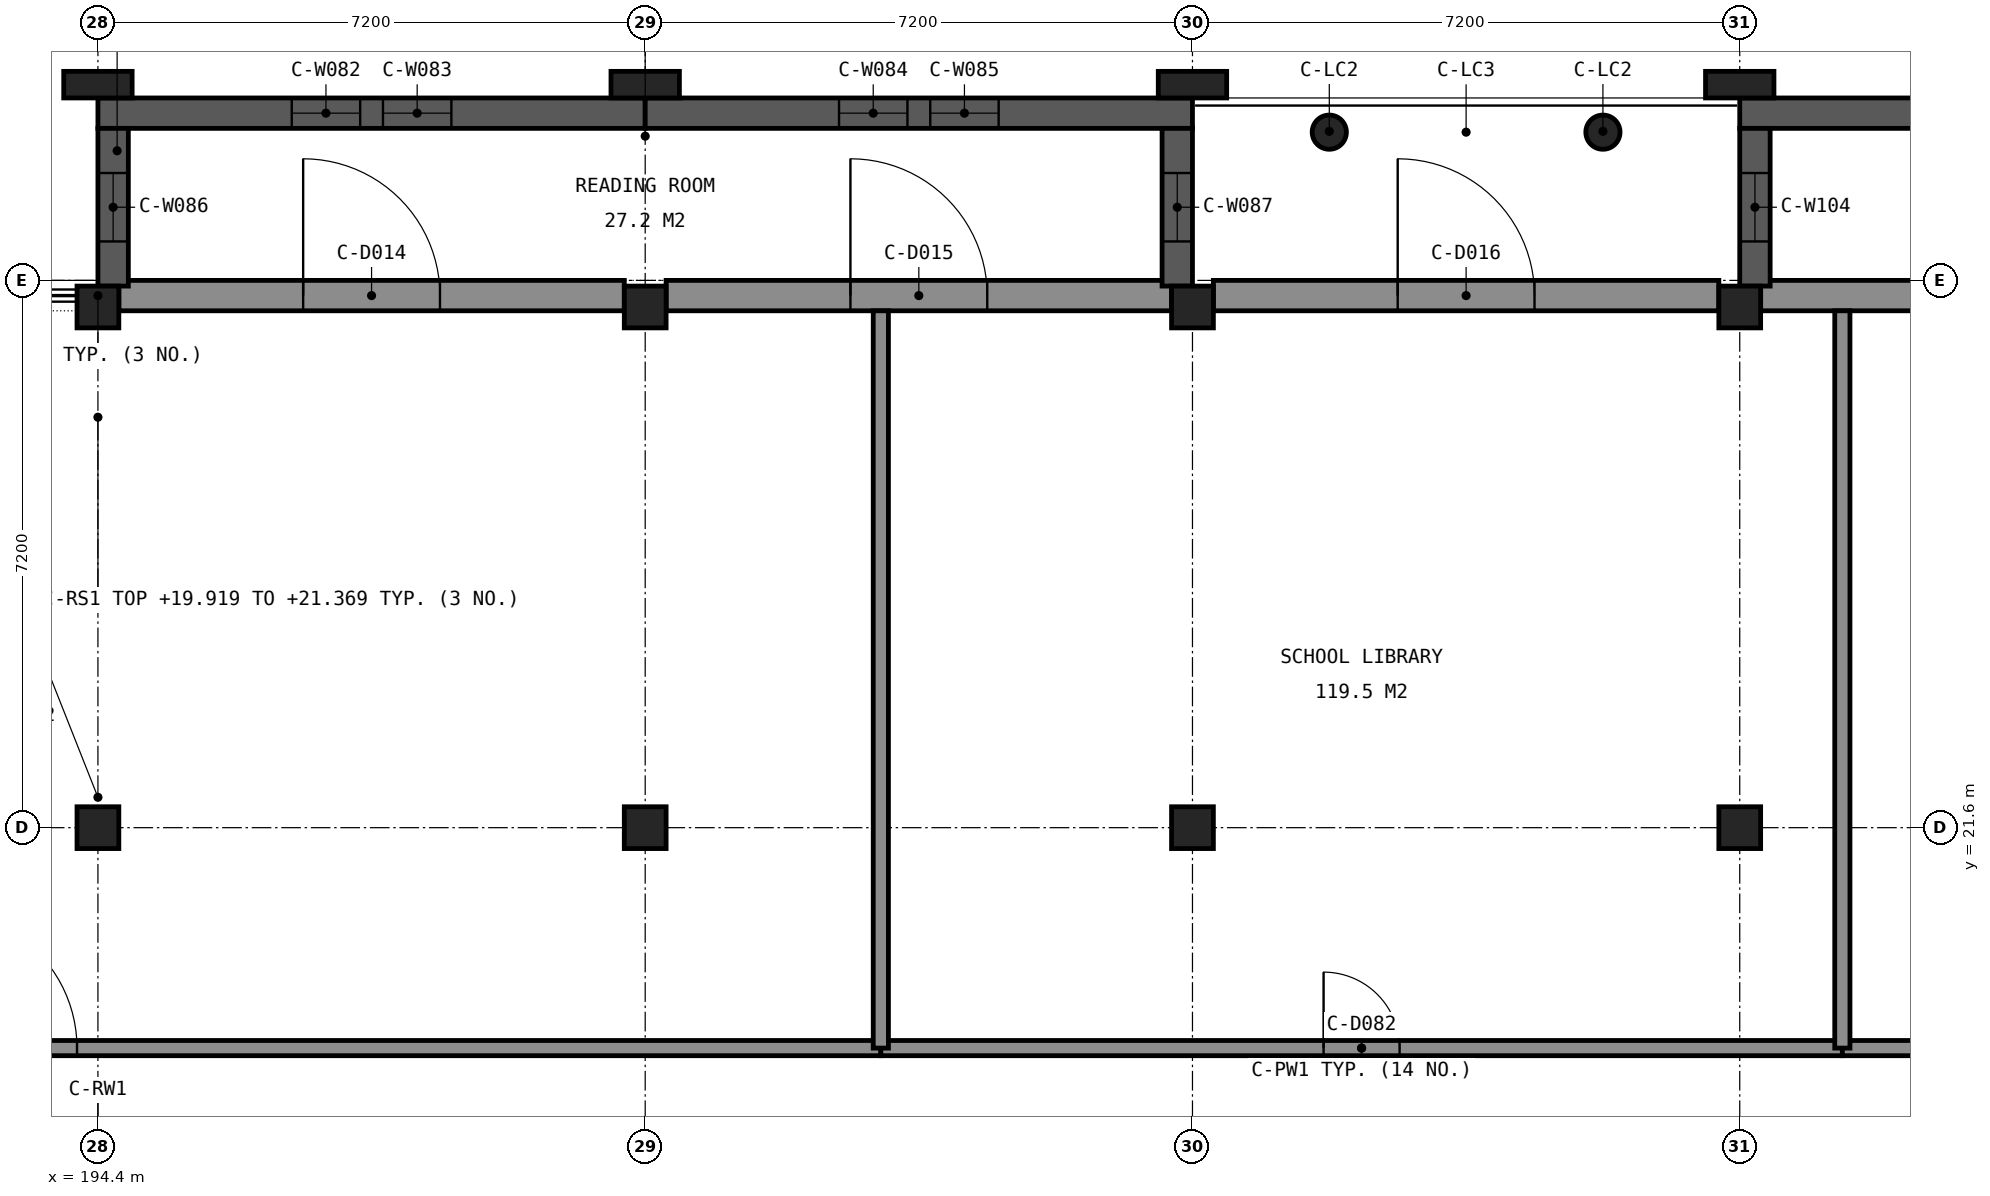
"""IFC4 building model, lengths in metres.
Left out: names, types, materials, properties, quantities, classifications, styles, units other than length and angle.
Written with IfcOpenShell. Run it as: python <this file> out.ifc"""

import sys

from ifc_helpers import new_model, si_unit, direction, frame, frame_2d, origin, origin_2d, place, context, subcontext, project, spatial, rectangle, circle, extrude, element, fill, save


model = new_model("IFC4")
c1 = context("Model", 3, precision=1e-05, world=origin(), true_north=direction((0.0, 1.0)))
c2 = subcontext(c1, "Body", "Model", "MODEL_VIEW")
j1 = project(units=[si_unit("LENGTHUNIT", "METRE"), si_unit("PLANEANGLEUNIT", "RADIAN")], contexts=[c1])
p1 = place(None, origin())
s1 = spatial("IfcSite", under=j1, at=p1, CompositionType="ELEMENT")
p2 = place(p1, origin())
s2 = spatial("IfcBuilding", under=s1, at=p2, CompositionType="ELEMENT")
p3 = place(p2, frame((0.0, 0.0, 14.4)))
s3 = spatial("IfcBuildingStorey", under=s2, at=p3, CompositionType="ELEMENT", Elevation=14.4)
for number, where, z_axis, x_axis in (
    (1, (194.4, 28.45, 0.0), (0.0, 0.0, 1.0), (1.0, 0.0, 0.0)),
    (2, (201.6, 28.45, 0.0), (0.0, 0.0, 1.0), (1.0, 0.0, 0.0)),
    (3, (208.8, 28.45, 0.0), (0.0, 0.0, 1.0), (1.0, 0.0, 0.0)),
    (4, (216.0, 28.45, 0.0), (0.0, 0.0, 1.0), (1.0, 0.0, 0.0)),
    (5, (194.4, 21.6, 0.0), (0.0, 0.0, 1.0), (1.0, 0.0, 0.0)),
    (6, (201.6, 21.6, 0.0), (0.0, 0.0, 1.0), (1.0, 0.0, 0.0)),
    (7, (208.8, 21.6, 0.0), (0.0, 0.0, 1.0), (1.0, 0.0, 0.0)),
    (8, (216.0, 21.6, 0.0), (0.0, 0.0, 1.0), (1.0, 0.0, 0.0)),
):
    element("IfcColumn", number, at=place(p3, frame(where, z_axis=z_axis, x_axis=x_axis)), inside=s3, PredefinedType="COLUMN", context=c2, shape_type="SweptSolid", body=[
        extrude(rectangle(XDim=0.55, YDim=0.55, at=origin_2d()), origin(), (0.0, 0.0, 1.0), 4.8),
    ])
p4 = place(p3, frame((194.675, 28.6, 0.0), z_axis=(0.0, 0.0, 1.0), x_axis=(1.0, 0.0, 0.0)))
e9 = element("IfcWall", 9, at=p4, inside=s3, PredefinedType="SOLIDWALL", context=c2, shape_type="SweptSolid", body=[
    extrude(rectangle(XDim=6.65, YDim=0.4, at=frame_2d((3.325, 0.0))), origin(), (0.0, 0.0, 1.0), 3.7),
])
p5 = place(p4, frame((2.425, 0.0, 0.0)))
e10 = element("IfcOpeningElement", 10, at=p5, cuts=e9, PredefinedType="OPENING", context=c2, shape_type="SweptSolid", body=[
    extrude(rectangle(XDim=1.8, YDim=2.1, at=frame_2d((0.9, 1.05))), frame((0.0, 0.21, 0.0), z_axis=(0.0, -1.0, 0.0), x_axis=(1.0, 0.0, 0.0)), (0.0, 0.0, 1.0), 0.42),
])
p6 = place(p3, frame((201.875, 28.6, 0.0), z_axis=(0.0, 0.0, 1.0), x_axis=(1.0, 0.0, 0.0)))
e11 = element("IfcWall", 11, at=p6, inside=s3, PredefinedType="SOLIDWALL", context=c2, shape_type="SweptSolid", body=[
    extrude(rectangle(XDim=6.65, YDim=0.4, at=frame_2d((3.325, 0.0))), origin(), (0.0, 0.0, 1.0), 3.7),
])
p7 = place(p6, frame((2.425, 0.0, 0.0)))
e12 = element("IfcOpeningElement", 12, at=p7, cuts=e11, PredefinedType="OPENING", context=c2, shape_type="SweptSolid", body=[
    extrude(rectangle(XDim=1.8, YDim=2.1, at=frame_2d((0.9, 1.05))), frame((0.0, 0.21, 0.0), z_axis=(0.0, -1.0, 0.0), x_axis=(1.0, 0.0, 0.0)), (0.0, 0.0, 1.0), 0.42),
])
p8 = place(p3, frame((209.075, 28.6, 0.0), z_axis=(0.0, 0.0, 1.0), x_axis=(1.0, 0.0, 0.0)))
e13 = element("IfcWall", 13, at=p8, inside=s3, PredefinedType="SOLIDWALL", context=c2, shape_type="SweptSolid", body=[
    extrude(rectangle(XDim=6.65, YDim=0.4, at=frame_2d((3.325, 0.0))), origin(), (0.0, 0.0, 1.0), 3.7),
])
p9 = place(p8, frame((2.425, 0.0, 0.0)))
e14 = element("IfcOpeningElement", 14, at=p9, cuts=e13, PredefinedType="OPENING", context=c2, shape_type="SweptSolid", body=[
    extrude(rectangle(XDim=1.8, YDim=2.1, at=frame_2d((0.9, 1.05))), frame((0.0, 0.21, 0.0), z_axis=(0.0, -1.0, 0.0), x_axis=(1.0, 0.0, 0.0)), (0.0, 0.0, 1.0), 0.42),
])
p10 = place(p3, frame((216.275, 28.6, 0.0), z_axis=(0.0, 0.0, 1.0), x_axis=(1.0, 0.0, 0.0)))
e15 = element("IfcWall", 15, at=p10, inside=s3, PredefinedType="SOLIDWALL", context=c2, shape_type="SweptSolid", body=[
    extrude(rectangle(XDim=6.65, YDim=0.4, at=frame_2d((3.325, 0.0))), origin(), (0.0, 0.0, 1.0), 3.7),
])
p11 = place(p10, frame((2.425, 0.0, 0.0)))
e16 = element("IfcOpeningElement", 16, at=p11, cuts=e15, PredefinedType="OPENING", context=c2, shape_type="SweptSolid", body=[
    extrude(rectangle(XDim=1.8, YDim=2.1, at=frame_2d((0.9, 1.05))), frame((0.0, 0.21, 0.0), z_axis=(0.0, -1.0, 0.0), x_axis=(1.0, 0.0, 0.0)), (0.0, 0.0, 1.0), 0.42),
])
p12 = place(p3, frame((158.4, 28.6, 4.8), z_axis=(0.0, 0.0, 1.0), x_axis=(1.0, 0.0, 0.0)))
e17 = element("IfcWall", 17, at=p12, inside=s3, PredefinedType="SOLIDWALL", context=c2, shape_type="SweptSolid", body=[
    extrude(rectangle(XDim=72.0, YDim=0.4, at=frame_2d((36.0, 0.0))), origin(), (0.0, 0.0, 1.0), 0.45),
])
for number, where, z_axis, x_axis in (
    (18, (194.4, 21.6, 4.8), (0.0, 0.0, 1.0), (1.0, 0.0, 0.0)),
    (19, (201.6, 21.6, 4.8), (0.0, 0.0, 1.0), (1.0, 0.0, 0.0)),
    (20, (208.8, 21.6, 4.8), (0.0, 0.0, 1.0), (1.0, 0.0, 0.0)),
    (21, (216.0, 21.6, 4.8), (0.0, 0.0, 1.0), (1.0, 0.0, 0.0)),
):
    element("IfcColumn", number, at=place(p3, frame(where, z_axis=z_axis, x_axis=x_axis)), inside=s3, PredefinedType="COLUMN", context=c2, shape_type="SweptSolid", body=[
        extrude(rectangle(XDim=0.3, YDim=0.3, at=origin_2d()), origin(), (0.0, 0.0, 1.0), 1.4),
    ])
p13 = place(p3, frame((194.4, 31.0, 0.0), z_axis=(0.0, 0.0, 1.0), x_axis=(1.0, 0.0, 0.0)))
e22 = element("IfcWall", 22, at=p13, inside=s3, PredefinedType="SOLIDWALL", context=c2, shape_type="SweptSolid", body=[
    extrude(rectangle(XDim=7.2, YDim=0.4, at=frame_2d((3.6, 0.0))), origin(), (0.0, 0.0, 1.0), 4.893),
])
p14 = place(p13, frame((2.55, 0.0, 1.8)))
e23 = element("IfcOpeningElement", 23, at=p14, cuts=e22, PredefinedType="OPENING", context=c2, shape_type="SweptSolid", body=[
    extrude(rectangle(XDim=0.9, YDim=1.2, at=frame_2d((0.45, 0.6))), frame((0.0, 0.21, 0.0), z_axis=(0.0, -1.0, 0.0), x_axis=(1.0, 0.0, 0.0)), (0.0, 0.0, 1.0), 0.42),
])
p15 = place(p13, frame((3.75, 0.0, 1.8)))
e24 = element("IfcOpeningElement", 24, at=p15, cuts=e22, PredefinedType="OPENING", context=c2, shape_type="SweptSolid", body=[
    extrude(rectangle(XDim=0.9, YDim=1.2, at=frame_2d((0.45, 0.6))), frame((0.0, 0.21, 0.0), z_axis=(0.0, -1.0, 0.0), x_axis=(1.0, 0.0, 0.0)), (0.0, 0.0, 1.0), 0.42),
])
p16 = place(p3, frame((201.6, 31.0, 0.0), z_axis=(0.0, 0.0, 1.0), x_axis=(1.0, 0.0, 0.0)))
e25 = element("IfcWall", 25, at=p16, inside=s3, PredefinedType="SOLIDWALL", context=c2, shape_type="SweptSolid", body=[
    extrude(rectangle(XDim=7.2, YDim=0.4, at=frame_2d((3.6, 0.0))), origin(), (0.0, 0.0, 1.0), 4.893),
])
p17 = place(p16, frame((2.55, 0.0, 1.8)))
e26 = element("IfcOpeningElement", 26, at=p17, cuts=e25, PredefinedType="OPENING", context=c2, shape_type="SweptSolid", body=[
    extrude(rectangle(XDim=0.9, YDim=1.2, at=frame_2d((0.45, 0.6))), frame((0.0, 0.21, 0.0), z_axis=(0.0, -1.0, 0.0), x_axis=(1.0, 0.0, 0.0)), (0.0, 0.0, 1.0), 0.42),
])
p18 = place(p16, frame((3.75, 0.0, 1.8)))
e27 = element("IfcOpeningElement", 27, at=p18, cuts=e25, PredefinedType="OPENING", context=c2, shape_type="SweptSolid", body=[
    extrude(rectangle(XDim=0.9, YDim=1.2, at=frame_2d((0.45, 0.6))), frame((0.0, 0.21, 0.0), z_axis=(0.0, -1.0, 0.0), x_axis=(1.0, 0.0, 0.0)), (0.0, 0.0, 1.0), 0.42),
])
p19 = place(p3, frame((194.6, 28.725, 0.0), z_axis=(0.0, 0.0, 1.0), x_axis=(0.0, 1.0, 0.0)))
e28 = element("IfcWall", 28, at=p19, inside=s3, PredefinedType="SOLIDWALL", context=c2, shape_type="SweptSolid", body=[
    extrude(rectangle(XDim=2.075, YDim=0.4, at=frame_2d((1.038, 0.0))), origin(), (0.0, 0.0, 1.0), 4.893),
])
p20 = place(p19, frame((0.587, 0.0, 1.8)))
e29 = element("IfcOpeningElement", 29, at=p20, cuts=e28, PredefinedType="OPENING", context=c2, shape_type="SweptSolid", body=[
    extrude(rectangle(XDim=0.9, YDim=1.2, at=frame_2d((0.45, 0.6))), frame((0.0, 0.21, 0.0), z_axis=(0.0, -1.0, 0.0), x_axis=(1.0, 0.0, 0.0)), (0.0, 0.0, 1.0), 0.42),
])
p21 = place(p3, frame((208.6, 30.8, 0.0), z_axis=(0.0, 0.0, 1.0), x_axis=(0.0, -1.0, 0.0)))
e30 = element("IfcWall", 30, at=p21, inside=s3, PredefinedType="SOLIDWALL", context=c2, shape_type="SweptSolid", body=[
    extrude(rectangle(XDim=2.075, YDim=0.4, at=frame_2d((1.038, 0.0))), origin(), (0.0, 0.0, 1.0), 4.893),
])
p22 = place(p21, frame((0.587, 0.0, 1.8)))
e31 = element("IfcOpeningElement", 31, at=p22, cuts=e30, PredefinedType="OPENING", context=c2, shape_type="SweptSolid", body=[
    extrude(rectangle(XDim=0.9, YDim=1.2, at=frame_2d((0.45, 0.6))), frame((0.0, 0.21, 0.0), z_axis=(0.0, -1.0, 0.0), x_axis=(1.0, 0.0, 0.0)), (0.0, 0.0, 1.0), 0.42),
])
for number, where, z_axis, x_axis in (
    (32, (194.4, 31.375, 0.0), (0.0, 0.0, 1.0), (1.0, 0.0, 0.0)),
    (33, (201.6, 31.375, 0.0), (0.0, 0.0, 1.0), (1.0, 0.0, 0.0)),
    (34, (208.8, 31.375, 0.0), (0.0, 0.0, 1.0), (1.0, 0.0, 0.0)),
):
    element("IfcColumn", number, at=place(p3, frame(where, z_axis=z_axis, x_axis=x_axis)), inside=s3, PredefinedType="PILASTER", context=c2, shape_type="SweptSolid", body=[
        extrude(rectangle(XDim=0.9, YDim=0.35, at=origin_2d()), origin(), (0.0, 0.0, 1.0), 3.9),
    ])
p23 = place(p3, frame((216.0, 31.0, 0.0), z_axis=(0.0, 0.0, 1.0), x_axis=(1.0, 0.0, 0.0)))
e35 = element("IfcWall", 35, at=p23, inside=s3, PredefinedType="SOLIDWALL", context=c2, shape_type="SweptSolid", body=[
    extrude(rectangle(XDim=7.2, YDim=0.4, at=frame_2d((3.6, 0.0))), origin(), (0.0, 0.0, 1.0), 4.893),
])
p24 = place(p23, frame((2.55, 0.0, 1.8)))
e36 = element("IfcOpeningElement", 36, at=p24, cuts=e35, PredefinedType="OPENING", context=c2, shape_type="SweptSolid", body=[
    extrude(rectangle(XDim=0.9, YDim=1.2, at=frame_2d((0.45, 0.6))), frame((0.0, 0.21, 0.0), z_axis=(0.0, -1.0, 0.0), x_axis=(1.0, 0.0, 0.0)), (0.0, 0.0, 1.0), 0.42),
])
p25 = place(p23, frame((3.75, 0.0, 1.8)))
e37 = element("IfcOpeningElement", 37, at=p25, cuts=e35, PredefinedType="OPENING", context=c2, shape_type="SweptSolid", body=[
    extrude(rectangle(XDim=0.9, YDim=1.2, at=frame_2d((0.45, 0.6))), frame((0.0, 0.21, 0.0), z_axis=(0.0, -1.0, 0.0), x_axis=(1.0, 0.0, 0.0)), (0.0, 0.0, 1.0), 0.42),
])
p26 = place(p3, frame((216.2, 28.725, 0.0), z_axis=(0.0, 0.0, 1.0), x_axis=(0.0, 1.0, 0.0)))
e38 = element("IfcWall", 38, at=p26, inside=s3, PredefinedType="SOLIDWALL", context=c2, shape_type="SweptSolid", body=[
    extrude(rectangle(XDim=2.075, YDim=0.4, at=frame_2d((1.038, 0.0))), origin(), (0.0, 0.0, 1.0), 4.893),
])
p27 = place(p26, frame((0.587, 0.0, 1.8)))
e39 = element("IfcOpeningElement", 39, at=p27, cuts=e38, PredefinedType="OPENING", context=c2, shape_type="SweptSolid", body=[
    extrude(rectangle(XDim=0.9, YDim=1.2, at=frame_2d((0.45, 0.6))), frame((0.0, 0.21, 0.0), z_axis=(0.0, -1.0, 0.0), x_axis=(1.0, 0.0, 0.0)), (0.0, 0.0, 1.0), 0.42),
])
p28 = place(p3, frame((216.0, 31.375, 0.0), z_axis=(0.0, 0.0, 1.0), x_axis=(1.0, 0.0, 0.0)))
e40 = element("IfcColumn", 40, at=p28, inside=s3, PredefinedType="PILASTER", context=c2, shape_type="SweptSolid", body=[
    extrude(rectangle(XDim=0.9, YDim=0.35, at=origin_2d()), origin(), (0.0, 0.0, 1.0), 3.9),
])
for number, where, z_axis, x_axis in (
    (41, (210.6, 30.75, 0.0), (0.0, 0.0, 1.0), (1.0, 0.0, 0.0)),
    (42, (214.2, 30.75, 0.0), (0.0, 0.0, 1.0), (1.0, 0.0, 0.0)),
):
    element("IfcColumn", number, at=place(p3, frame(where, z_axis=z_axis, x_axis=x_axis)), inside=s3, PredefinedType="COLUMN", context=c2, shape_type="SweptSolid", body=[
        extrude(circle(Radius=0.225, at=origin_2d()), origin(), (0.0, 0.0, 1.0), 3.95),
    ])
p29 = place(p3, frame((208.8, 30.75, 4.3), z_axis=(0.0, 0.0, 1.0), x_axis=(1.0, 0.0, 0.0)))
e43 = element("IfcWall", 43, at=p29, inside=s3, PredefinedType="SOLIDWALL", context=c2, shape_type="SweptSolid", body=[
    extrude(rectangle(XDim=7.2, YDim=0.9, at=frame_2d((3.6, 0.0))), origin(), (0.0, 0.0, 1.0), 0.2),
])
p30 = place(p3, frame((181.75, 18.7, 0.0), z_axis=(0.0, 0.0, 1.0), x_axis=(1.0, 0.0, 0.0)))
e44 = element("IfcWall", 44, at=p30, inside=s3, PredefinedType="PARTITIONING", context=c2, shape_type="SweptSolid", body=[
    extrude(rectangle(XDim=22.95, YDim=0.2, at=frame_2d((11.475, 0.0))), origin(), (0.0, 0.0, 1.0), 3.7),
])
p31 = place(p30, frame((10.575, 0.0, 0.0)))
e45 = element("IfcOpeningElement", 45, at=p31, cuts=e44, PredefinedType="OPENING", context=c2, shape_type="SweptSolid", body=[
    extrude(rectangle(XDim=1.8, YDim=2.1, at=frame_2d((0.9, 1.05))), frame((0.0, 0.11, 0.0), z_axis=(0.0, -1.0, 0.0), x_axis=(1.0, 0.0, 0.0)), (0.0, 0.0, 1.0), 0.22),
])
p32 = place(p3, frame((204.7, 18.7, 0.0), z_axis=(0.0, 0.0, 1.0), x_axis=(1.0, 0.0, 0.0)))
e46 = element("IfcWall", 46, at=p32, inside=s3, PredefinedType="PARTITIONING", context=c2, shape_type="SweptSolid", body=[
    extrude(rectangle(XDim=12.65, YDim=0.2, at=frame_2d((6.325, 0.0))), origin(), (0.0, 0.0, 1.0), 3.7),
])
p33 = place(p32, frame((5.825, 0.0, 0.0)))
e47 = element("IfcOpeningElement", 47, at=p33, cuts=e46, PredefinedType="OPENING", context=c2, shape_type="SweptSolid", body=[
    extrude(rectangle(XDim=1.0, YDim=2.1, at=frame_2d((0.5, 1.05))), frame((0.0, 0.11, 0.0), z_axis=(0.0, -1.0, 0.0), x_axis=(1.0, 0.0, 0.0)), (0.0, 0.0, 1.0), 0.22),
])
p34 = place(p3, frame((217.35, 18.7, 0.0), z_axis=(0.0, 0.0, 1.0), x_axis=(1.0, 0.0, 0.0)))
e48 = element("IfcWall", 48, at=p34, inside=s3, PredefinedType="PARTITIONING", context=c2, shape_type="SweptSolid", body=[
    extrude(rectangle(XDim=12.65, YDim=0.2, at=frame_2d((6.325, 0.0))), origin(), (0.0, 0.0, 1.0), 3.7),
])
p35 = place(p34, frame((5.825, 0.0, 0.0)))
e49 = element("IfcOpeningElement", 49, at=p35, cuts=e48, PredefinedType="OPENING", context=c2, shape_type="SweptSolid", body=[
    extrude(rectangle(XDim=1.0, YDim=2.1, at=frame_2d((0.5, 1.05))), frame((0.0, 0.11, 0.0), z_axis=(0.0, -1.0, 0.0), x_axis=(1.0, 0.0, 0.0)), (0.0, 0.0, 1.0), 0.22),
])
for number, where, z_axis, x_axis in (
    (50, (204.7, 28.4, 0.0), (0.0, 0.0, 1.0), (0.0, -1.0, 0.0)),
    (51, (217.35, 28.4, 0.0), (0.0, 0.0, 1.0), (0.0, -1.0, 0.0)),
):
    element("IfcWall", number, at=place(p3, frame(where, z_axis=z_axis, x_axis=x_axis)), inside=s3, PredefinedType="PARTITIONING", context=c2, shape_type="SweptSolid", body=[
        extrude(rectangle(XDim=9.7, YDim=0.2, at=frame_2d((4.85, 0.0))), origin(), (0.0, 0.0, 1.0), 3.7),
    ])
p36 = place(p5, origin())
e52 = element("IfcDoor", 52, at=p36, inside=s3, OperationType="NOTDEFINED", PredefinedType="DOOR", context=c2, shape_type="SweptSolid", body=[
    extrude(rectangle(XDim=1.8, YDim=2.1, at=frame_2d((0.9, 1.05))), frame((0.0, 0.025, 0.0), z_axis=(0.0, -1.0, 0.0), x_axis=(1.0, 0.0, 0.0)), (0.0, 0.0, 1.0), 0.05),
])
fill(e10, e52)
p37 = place(p7, origin())
e53 = element("IfcDoor", 53, at=p37, inside=s3, OperationType="NOTDEFINED", PredefinedType="DOOR", context=c2, shape_type="SweptSolid", body=[
    extrude(rectangle(XDim=1.8, YDim=2.1, at=frame_2d((0.9, 1.05))), frame((0.0, 0.025, 0.0), z_axis=(0.0, -1.0, 0.0), x_axis=(1.0, 0.0, 0.0)), (0.0, 0.0, 1.0), 0.05),
])
fill(e12, e53)
p38 = place(p9, origin())
e54 = element("IfcDoor", 54, at=p38, inside=s3, OperationType="NOTDEFINED", PredefinedType="DOOR", context=c2, shape_type="SweptSolid", body=[
    extrude(rectangle(XDim=1.8, YDim=2.1, at=frame_2d((0.9, 1.05))), frame((0.0, 0.025, 0.0), z_axis=(0.0, -1.0, 0.0), x_axis=(1.0, 0.0, 0.0)), (0.0, 0.0, 1.0), 0.05),
])
fill(e14, e54)
p39 = place(p14, origin())
e55 = element("IfcWindow", 55, at=p39, inside=s3, PartitioningType="SINGLE_PANEL", PredefinedType="WINDOW", context=c2, shape_type="SweptSolid", body=[
    extrude(rectangle(XDim=0.9, YDim=1.2, at=frame_2d((0.45, 0.6))), frame((0.0, -0.09, 0.0), z_axis=(0.0, -1.0, 0.0), x_axis=(1.0, 0.0, 0.0)), (0.0, 0.0, 1.0), 0.06),
])
fill(e23, e55)
p40 = place(p15, origin())
e56 = element("IfcWindow", 56, at=p40, inside=s3, PartitioningType="SINGLE_PANEL", PredefinedType="WINDOW", context=c2, shape_type="SweptSolid", body=[
    extrude(rectangle(XDim=0.9, YDim=1.2, at=frame_2d((0.45, 0.6))), frame((0.0, -0.09, 0.0), z_axis=(0.0, -1.0, 0.0), x_axis=(1.0, 0.0, 0.0)), (0.0, 0.0, 1.0), 0.06),
])
fill(e24, e56)
p41 = place(p17, origin())
e57 = element("IfcWindow", 57, at=p41, inside=s3, PartitioningType="SINGLE_PANEL", PredefinedType="WINDOW", context=c2, shape_type="SweptSolid", body=[
    extrude(rectangle(XDim=0.9, YDim=1.2, at=frame_2d((0.45, 0.6))), frame((0.0, -0.09, 0.0), z_axis=(0.0, -1.0, 0.0), x_axis=(1.0, 0.0, 0.0)), (0.0, 0.0, 1.0), 0.06),
])
fill(e26, e57)
p42 = place(p18, origin())
e58 = element("IfcWindow", 58, at=p42, inside=s3, PartitioningType="SINGLE_PANEL", PredefinedType="WINDOW", context=c2, shape_type="SweptSolid", body=[
    extrude(rectangle(XDim=0.9, YDim=1.2, at=frame_2d((0.45, 0.6))), frame((0.0, -0.09, 0.0), z_axis=(0.0, -1.0, 0.0), x_axis=(1.0, 0.0, 0.0)), (0.0, 0.0, 1.0), 0.06),
])
fill(e27, e58)
p43 = place(p20, origin())
e59 = element("IfcWindow", 59, at=p43, inside=s3, PartitioningType="SINGLE_PANEL", PredefinedType="WINDOW", context=c2, shape_type="SweptSolid", body=[
    extrude(rectangle(XDim=0.9, YDim=1.2, at=frame_2d((0.45, 0.6))), frame((0.0, -0.09, 0.0), z_axis=(0.0, -1.0, 0.0), x_axis=(1.0, 0.0, 0.0)), (0.0, 0.0, 1.0), 0.06),
])
fill(e29, e59)
p44 = place(p22, origin())
e60 = element("IfcWindow", 60, at=p44, inside=s3, PartitioningType="SINGLE_PANEL", PredefinedType="WINDOW", context=c2, shape_type="SweptSolid", body=[
    extrude(rectangle(XDim=0.9, YDim=1.2, at=frame_2d((0.45, 0.6))), frame((0.0, -0.09, 0.0), z_axis=(0.0, -1.0, 0.0), x_axis=(1.0, 0.0, 0.0)), (0.0, 0.0, 1.0), 0.06),
])
fill(e31, e60)
p45 = place(p27, origin())
e61 = element("IfcWindow", 61, at=p45, inside=s3, PartitioningType="SINGLE_PANEL", PredefinedType="WINDOW", context=c2, shape_type="SweptSolid", body=[
    extrude(rectangle(XDim=0.9, YDim=1.2, at=frame_2d((0.45, 0.6))), frame((0.0, -0.09, 0.0), z_axis=(0.0, -1.0, 0.0), x_axis=(1.0, 0.0, 0.0)), (0.0, 0.0, 1.0), 0.06),
])
fill(e39, e61)
p46 = place(p31, origin())
e62 = element("IfcDoor", 62, at=p46, inside=s3, OperationType="NOTDEFINED", PredefinedType="DOOR", context=c2, shape_type="SweptSolid", body=[
    extrude(rectangle(XDim=1.8, YDim=2.1, at=frame_2d((0.9, 1.05))), frame((0.0, 0.025, 0.0), z_axis=(0.0, -1.0, 0.0), x_axis=(1.0, 0.0, 0.0)), (0.0, 0.0, 1.0), 0.05),
])
fill(e45, e62)
p47 = place(p33, origin())
e63 = element("IfcDoor", 63, at=p47, inside=s3, OperationType="NOTDEFINED", PredefinedType="DOOR", context=c2, shape_type="SweptSolid", body=[
    extrude(rectangle(XDim=1.0, YDim=2.1, at=frame_2d((0.5, 1.05))), frame((0.0, 0.025, 0.0), z_axis=(0.0, -1.0, 0.0), x_axis=(1.0, 0.0, 0.0)), (0.0, 0.0, 1.0), 0.05),
])
fill(e47, e63)
save(model, sys.argv[1])
